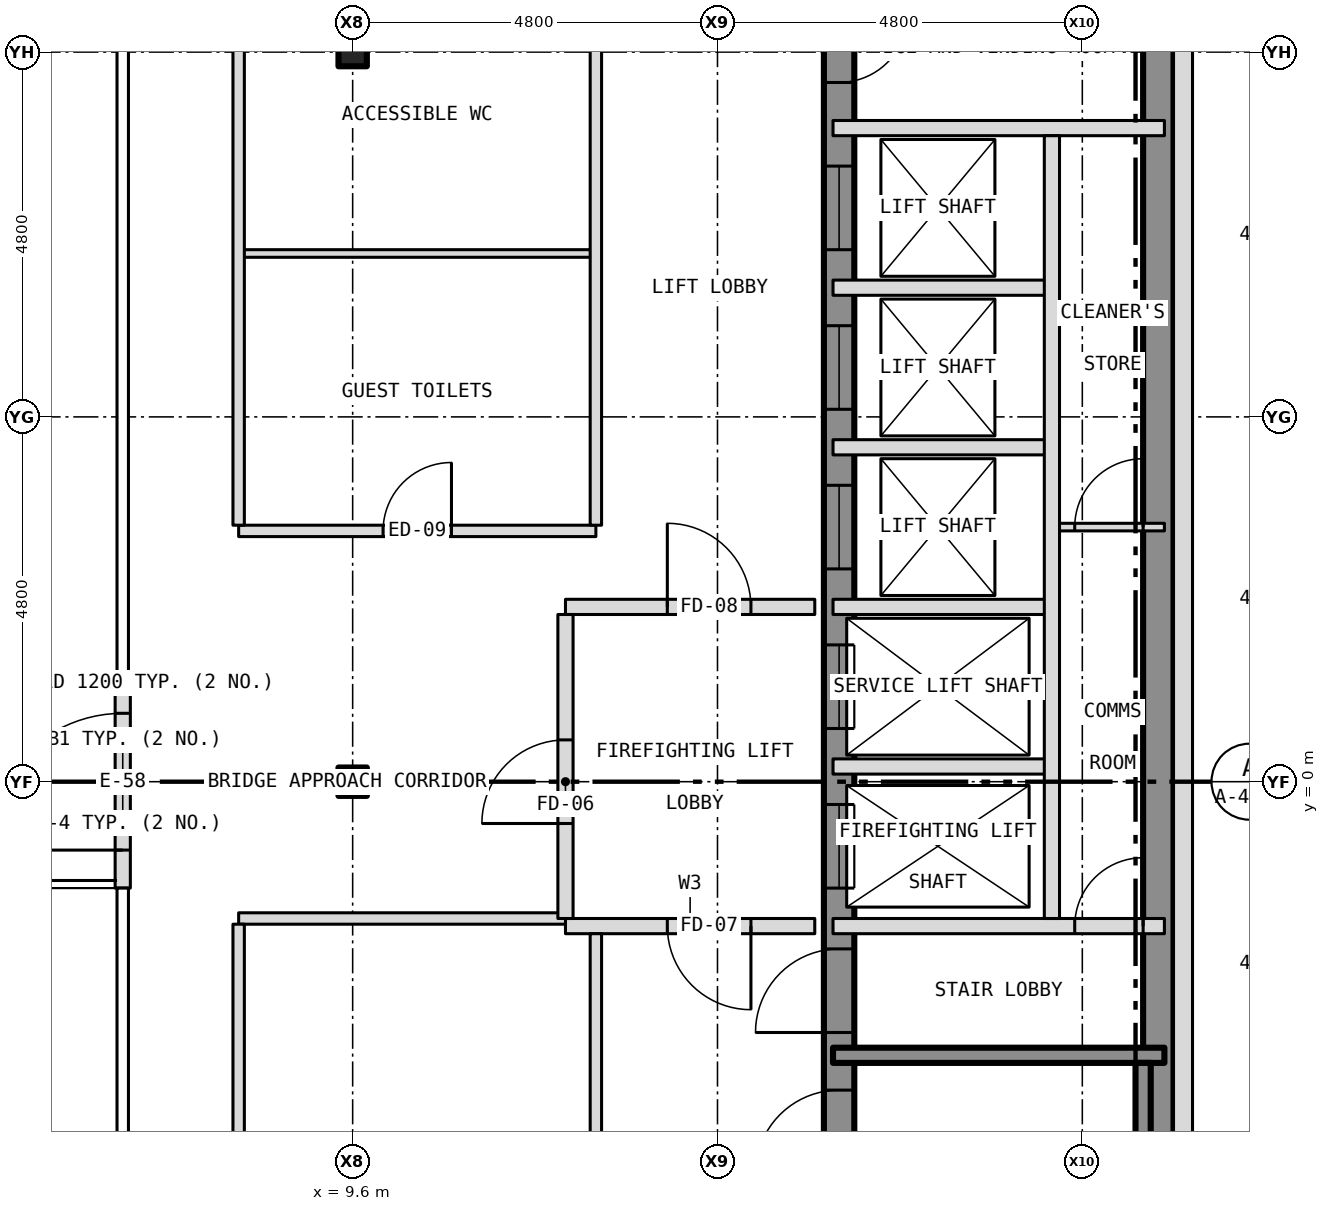
"""IFC4 building model, lengths in metres.
Left out: names, types, materials, properties, quantities, classifications, styles, units other than length and angle.
Written with IfcOpenShell. Run it as: python <this file> out.ifc"""

import sys

from ifc_helpers import new_model, si_unit, direction, frame, frame_2d, origin, origin_2d, place, context, subcontext, project, spatial, rectangle, i_section, extrude, element, fill, save


model = new_model("IFC4")
c1 = context("Model", 3, precision=1e-05, world=origin(), true_north=direction((0.0, 1.0)))
c2 = subcontext(c1, "Body", "Model", "MODEL_VIEW")
j1 = project(units=[si_unit("LENGTHUNIT", "METRE"), si_unit("PLANEANGLEUNIT", "RADIAN")], contexts=[c1])
p1 = place(None, origin())
s1 = spatial("IfcSite", under=j1, at=p1, CompositionType="ELEMENT")
p2 = place(p1, origin())
s2 = spatial("IfcBuilding", under=s1, at=p2, CompositionType="ELEMENT")
p3 = place(p2, frame((0.0, 0.0, 222.5)))
s3 = spatial("IfcBuildingStorey", under=s2, at=p3, CompositionType="ELEMENT", Elevation=222.5)
for number, where, z_axis, x_axis in (
    (1, (9.6, 0.0, -0.15), (0.0, 0.0, 1.0), (1.0, 0.0, 0.0)),
    (2, (9.6, 9.6, -0.15), (0.0, 0.0, 1.0), (1.0, 0.0, 0.0)),
):
    element("IfcColumn", number, at=place(p3, frame(where, z_axis=z_axis, x_axis=x_axis)), inside=s3, PredefinedType="COLUMN", context=c2, shape_type="SweptSolid", body=[
        extrude(i_section(OverallWidth=0.373, OverallDepth=0.373, WebThickness=0.016, FlangeThickness=0.026, at=origin_2d()), origin(), (0.0, 0.0, 1.0), 3.5),
    ])
p4 = place(p3, frame((16.0, -10.8, 0.0), z_axis=(0.0, 0.0, 1.0), x_axis=(0.0, 1.0, 0.0)))
e3 = element("IfcWall", 3, at=p4, inside=s3, PredefinedType="SHEAR", context=c2, shape_type="SweptSolid", body=[
    extrude(rectangle(XDim=21.6, YDim=0.4, at=frame_2d((10.8, 0.0))), origin(), (0.0, 0.0, 1.0), 3.25),
])
p5 = place(p4, frame((9.4, 0.0, 0.0)))
e4 = element("IfcOpeningElement", 4, at=p5, cuts=e3, PredefinedType="OPENING", context=c2, shape_type="SweptSolid", body=[
    extrude(rectangle(XDim=1.1, YDim=2.1, at=frame_2d((0.55, 1.05))), frame((0.0, 0.212, 0.0), z_axis=(0.0, -1.0, 0.0), x_axis=(1.0, 0.0, 0.0)), (0.0, 0.0, 1.0), 0.424),
])
p6 = place(p4, frame((11.5, 0.0, 0.0)))
e5 = element("IfcOpeningElement", 5, at=p6, cuts=e3, PredefinedType="OPENING", context=c2, shape_type="SweptSolid", body=[
    extrude(rectangle(XDim=1.1, YDim=2.1, at=frame_2d((0.55, 1.05))), frame((0.0, 0.212, 0.0), z_axis=(0.0, -1.0, 0.0), x_axis=(1.0, 0.0, 0.0)), (0.0, 0.0, 1.0), 0.424),
])
p7 = place(p4, frame((13.6, 0.0, 0.0)))
e6 = element("IfcOpeningElement", 6, at=p7, cuts=e3, PredefinedType="OPENING", context=c2, shape_type="SweptSolid", body=[
    extrude(rectangle(XDim=1.1, YDim=2.1, at=frame_2d((0.55, 1.05))), frame((0.0, 0.212, 0.0), z_axis=(0.0, -1.0, 0.0), x_axis=(1.0, 0.0, 0.0)), (0.0, 0.0, 1.0), 0.424),
])
p8 = place(p4, frame((15.7, 0.0, 0.0)))
e7 = element("IfcOpeningElement", 7, at=p8, cuts=e3, PredefinedType="OPENING", context=c2, shape_type="SweptSolid", body=[
    extrude(rectangle(XDim=1.1, YDim=2.1, at=frame_2d((0.55, 1.05))), frame((0.0, 0.212, 0.0), z_axis=(0.0, -1.0, 0.0), x_axis=(1.0, 0.0, 0.0)), (0.0, 0.0, 1.0), 0.424),
])
p9 = place(p4, frame((17.8, 0.0, 0.0)))
e8 = element("IfcOpeningElement", 8, at=p9, cuts=e3, PredefinedType="OPENING", context=c2, shape_type="SweptSolid", body=[
    extrude(rectangle(XDim=1.1, YDim=2.1, at=frame_2d((0.55, 1.05))), frame((0.0, 0.212, 0.0), z_axis=(0.0, -1.0, 0.0), x_axis=(1.0, 0.0, 0.0)), (0.0, 0.0, 1.0), 0.424),
])
p10 = place(p4, frame((5.642, 0.0, 0.0)))
e9 = element("IfcOpeningElement", 9, at=p10, cuts=e3, PredefinedType="OPENING", context=c2, shape_type="SweptSolid", body=[
    extrude(rectangle(XDim=1.1, YDim=2.1, at=frame_2d((0.55, 1.05))), frame((0.0, 0.212, 0.0), z_axis=(0.0, -1.0, 0.0), x_axis=(1.0, 0.0, 0.0)), (0.0, 0.0, 1.0), 0.424),
])
p11 = place(p4, frame((7.5, 0.0, 0.0)))
e10 = element("IfcOpeningElement", 10, at=p11, cuts=e3, PredefinedType="OPENING", context=c2, shape_type="SweptSolid", body=[
    extrude(rectangle(XDim=1.1, YDim=2.1, at=frame_2d((0.55, 1.05))), frame((0.0, 0.212, 0.0), z_axis=(0.0, -1.0, 0.0), x_axis=(1.0, 0.0, 0.0)), (0.0, 0.0, 1.0), 0.424),
])
p12 = place(p4, frame((20.0, 0.0, 0.0)))
e11 = element("IfcOpeningElement", 11, at=p12, cuts=e3, PredefinedType="OPENING", context=c2, shape_type="SweptSolid", body=[
    extrude(rectangle(XDim=0.9, YDim=2.1, at=frame_2d((0.45, 1.05))), frame((0.0, 0.212, 0.0), z_axis=(0.0, -1.0, 0.0), x_axis=(1.0, 0.0, 0.0)), (0.0, 0.0, 1.0), 0.424),
])
p13 = place(p3, frame((20.2, -10.8, 0.0), z_axis=(0.0, 0.0, 1.0), x_axis=(0.0, 1.0, 0.0)))
e12 = element("IfcWall", 12, at=p13, inside=s3, PredefinedType="SHEAR", context=c2, shape_type="SweptSolid", body=[
    extrude(rectangle(XDim=21.6, YDim=0.4, at=frame_2d((10.8, 0.0))), origin(), (0.0, 0.0, 1.0), 3.25),
])
p14 = place(p3, frame((20.525, -10.8, 0.0), z_axis=(0.0, 0.0, 1.0), x_axis=(0.0, 1.0, 0.0)))
e13 = element("IfcWall", 13, at=p14, inside=s3, PredefinedType="SOLIDWALL", context=c2, shape_type="SweptSolid", body=[
    extrude(rectangle(XDim=21.6, YDim=0.25, at=frame_2d((10.8, 0.0))), origin(), (0.0, 0.0, 1.0), 3.5),
])
p15 = place(p14, frame((2.95, 0.0, 1.0)))
e14 = element("IfcOpeningElement", 14, at=p15, cuts=e13, PredefinedType="OPENING", context=c2, shape_type="SweptSolid", body=[
    extrude(rectangle(XDim=0.6, YDim=1.5, at=frame_2d((0.3, 0.75))), frame((0.0, 0.137, 0.0), z_axis=(0.0, -1.0, 0.0), x_axis=(1.0, 0.0, 0.0)), (0.0, 0.0, 1.0), 0.274),
])
p16 = place(p3, frame((6.575, -1.4, 0.0), z_axis=(0.0, 0.0, 1.0), x_axis=(0.0, 1.0, 0.0)))
e15 = element("IfcWall", 15, at=p16, inside=s3, PredefinedType="SOLIDWALL", context=c2, shape_type="SweptSolid", body=[
    extrude(rectangle(XDim=2.8, YDim=0.2, at=frame_2d((1.4, 0.0))), origin(), (0.0, 0.0, 1.0), 3.5),
])
p17 = place(p16, frame((0.5, 0.0, 0.0)))
e16 = element("IfcOpeningElement", 16, at=p17, cuts=e15, PredefinedType="OPENING", context=c2, shape_type="SweptSolid", body=[
    extrude(rectangle(XDim=1.8, YDim=2.1, at=frame_2d((0.9, 1.05))), frame((0.0, 0.112, 0.0), z_axis=(0.0, -1.0, 0.0), x_axis=(1.0, 0.0, 0.0)), (0.0, 0.0, 1.0), 0.224),
])
p18 = place(p3, frame((15.92, -3.6, 0.0), z_axis=(0.0, 0.0, 1.0), x_axis=(1.0, 0.0, 0.0)))
e17 = element("IfcWall", 17, at=p18, inside=s3, PredefinedType="SHEAR", context=c2, shape_type="SweptSolid", body=[
    extrude(rectangle(XDim=4.36, YDim=0.2, at=frame_2d((2.18, 0.0))), origin(), (0.0, 0.0, 1.0), 3.25),
])
p19 = place(p3, frame((12.4, -1.9, 0.0), z_axis=(0.0, 0.0, 1.0), x_axis=(1.0, 0.0, 0.0)))
e18 = element("IfcWall", 18, at=p19, inside=s3, PredefinedType="PARTITIONING", context=c2, shape_type="SweptSolid", body=[
    extrude(rectangle(XDim=3.28, YDim=0.2, at=frame_2d((1.64, 0.0))), origin(), (0.0, 0.0, 1.0), 3.35),
])
p20 = place(p19, frame((1.34, 0.0, 0.0)))
e19 = element("IfcOpeningElement", 19, at=p20, cuts=e18, PredefinedType="OPENING", context=c2, shape_type="SweptSolid", body=[
    extrude(rectangle(XDim=1.1, YDim=2.1, at=frame_2d((0.55, 1.05))), frame((0.0, 0.112, 0.0), z_axis=(0.0, -1.0, 0.0), x_axis=(1.0, 0.0, 0.0)), (0.0, 0.0, 1.0), 0.224),
])
p21 = place(p3, frame((15.92, -1.9, 0.0), z_axis=(0.0, 0.0, 1.0), x_axis=(1.0, 0.0, 0.0)))
e20 = element("IfcWall", 20, at=p21, inside=s3, PredefinedType="PARTITIONING", context=c2, shape_type="SweptSolid", body=[
    extrude(rectangle(XDim=4.36, YDim=0.2, at=frame_2d((2.18, 0.0))), origin(), (0.0, 0.0, 1.0), 3.25),
])
p22 = place(p21, frame((3.18, 0.0, 0.0)))
e21 = element("IfcOpeningElement", 21, at=p22, cuts=e20, PredefinedType="OPENING", context=c2, shape_type="SweptSolid", body=[
    extrude(rectangle(XDim=0.9, YDim=2.1, at=frame_2d((0.45, 1.05))), frame((0.0, 0.112, 0.0), z_axis=(0.0, -1.0, 0.0), x_axis=(1.0, 0.0, 0.0)), (0.0, 0.0, 1.0), 0.224),
])
p23 = place(p3, frame((8.1, -1.8, 0.0), z_axis=(0.0, 0.0, 1.0), x_axis=(1.0, 0.0, 0.0)))
e22 = element("IfcWall", 22, at=p23, inside=s3, PredefinedType="PARTITIONING", context=c2, shape_type="SweptSolid", body=[
    extrude(rectangle(XDim=4.3, YDim=0.15, at=frame_2d((2.15, 0.0))), origin(), (0.0, 0.0, 1.0), 3.35),
])
p24 = place(p3, frame((15.92, 0.2, 0.0), z_axis=(0.0, 0.0, 1.0), x_axis=(1.0, 0.0, 0.0)))
e23 = element("IfcWall", 23, at=p24, inside=s3, PredefinedType="PARTITIONING", context=c2, shape_type="SweptSolid", body=[
    extrude(rectangle(XDim=2.88, YDim=0.2, at=frame_2d((1.44, 0.0))), origin(), (0.0, 0.0, 1.0), 3.25),
])
p25 = place(p3, frame((12.4, 2.3, 0.0), z_axis=(0.0, 0.0, 1.0), x_axis=(1.0, 0.0, 0.0)))
e24 = element("IfcWall", 24, at=p25, inside=s3, PredefinedType="PARTITIONING", context=c2, shape_type="SweptSolid", body=[
    extrude(rectangle(XDim=3.28, YDim=0.2, at=frame_2d((1.64, 0.0))), origin(), (0.0, 0.0, 1.0), 3.35),
])
p26 = place(p25, frame((1.34, 0.0, 0.0)))
e25 = element("IfcOpeningElement", 25, at=p26, cuts=e24, PredefinedType="OPENING", context=c2, shape_type="SweptSolid", body=[
    extrude(rectangle(XDim=1.1, YDim=2.1, at=frame_2d((0.55, 1.05))), frame((0.0, 0.112, 0.0), z_axis=(0.0, -1.0, 0.0), x_axis=(1.0, 0.0, 0.0)), (0.0, 0.0, 1.0), 0.224),
])
p27 = place(p3, frame((15.92, 2.3, 0.0), z_axis=(0.0, 0.0, 1.0), x_axis=(1.0, 0.0, 0.0)))
e26 = element("IfcWall", 26, at=p27, inside=s3, PredefinedType="PARTITIONING", context=c2, shape_type="SweptSolid", body=[
    extrude(rectangle(XDim=2.88, YDim=0.2, at=frame_2d((1.44, 0.0))), origin(), (0.0, 0.0, 1.0), 3.25),
])
p28 = place(p3, frame((8.1, 3.3, 0.0), z_axis=(0.0, 0.0, 1.0), x_axis=(1.0, 0.0, 0.0)))
e27 = element("IfcWall", 27, at=p28, inside=s3, PredefinedType="PARTITIONING", context=c2, shape_type="SweptSolid", body=[
    extrude(rectangle(XDim=4.7, YDim=0.15, at=frame_2d((2.35, 0.0))), origin(), (0.0, 0.0, 1.0), 3.35),
])
p29 = place(p28, frame((1.9, 0.0, 0.0)))
e28 = element("IfcOpeningElement", 28, at=p29, cuts=e27, PredefinedType="OPENING", context=c2, shape_type="SweptSolid", body=[
    extrude(rectangle(XDim=0.9, YDim=2.1, at=frame_2d((0.45, 1.05))), frame((0.0, 0.087, 0.0), z_axis=(0.0, -1.0, 0.0), x_axis=(1.0, 0.0, 0.0)), (0.0, 0.0, 1.0), 0.174),
])
p30 = place(p3, frame((18.8, 3.35, 0.0), z_axis=(0.0, 0.0, 1.0), x_axis=(1.0, 0.0, 0.0)))
e29 = element("IfcWall", 29, at=p30, inside=s3, PredefinedType="PARTITIONING", context=c2, shape_type="SweptSolid", body=[
    extrude(rectangle(XDim=1.48, YDim=0.1, at=frame_2d((0.74, 0.0))), origin(), (0.0, 0.0, 1.0), 3.25),
])
p31 = place(p30, frame((0.3, 0.0, 0.0)))
e30 = element("IfcOpeningElement", 30, at=p31, cuts=e29, PredefinedType="OPENING", context=c2, shape_type="SweptSolid", body=[
    extrude(rectangle(XDim=0.9, YDim=2.1, at=frame_2d((0.45, 1.05))), frame((0.0, 0.062, 0.0), z_axis=(0.0, -1.0, 0.0), x_axis=(1.0, 0.0, 0.0)), (0.0, 0.0, 1.0), 0.124),
])
for number, where, z_axis, x_axis in (
    (31, (15.92, 4.4, 0.0), (0.0, 0.0, 1.0), (1.0, 0.0, 0.0)),
    (32, (15.92, 6.5, 0.0), (0.0, 0.0, 1.0), (1.0, 0.0, 0.0)),
):
    element("IfcWall", number, at=place(p3, frame(where, z_axis=z_axis, x_axis=x_axis)), inside=s3, PredefinedType="PARTITIONING", context=c2, shape_type="SweptSolid", body=[
        extrude(rectangle(XDim=2.88, YDim=0.2, at=frame_2d((1.44, 0.0))), origin(), (0.0, 0.0, 1.0), 3.25),
    ])
p32 = place(p3, frame((8.1, 6.95, 0.0), z_axis=(0.0, 0.0, 1.0), x_axis=(1.0, 0.0, 0.0)))
e33 = element("IfcWall", 33, at=p32, inside=s3, PredefinedType="PARTITIONING", context=c2, shape_type="SweptSolid", body=[
    extrude(rectangle(XDim=4.7, YDim=0.1, at=frame_2d((2.35, 0.0))), origin(), (0.0, 0.0, 1.0), 3.35),
])
p33 = place(p3, frame((15.92, 8.6, 0.0), z_axis=(0.0, 0.0, 1.0), x_axis=(1.0, 0.0, 0.0)))
e34 = element("IfcWall", 34, at=p33, inside=s3, PredefinedType="PARTITIONING", context=c2, shape_type="SweptSolid", body=[
    extrude(rectangle(XDim=4.36, YDim=0.2, at=frame_2d((2.18, 0.0))), origin(), (0.0, 0.0, 1.0), 3.25),
])
p34 = place(p3, frame((8.1, -10.525, 0.0), z_axis=(0.0, 0.0, 1.0), x_axis=(0.0, 1.0, 0.0)))
e35 = element("IfcWall", 35, at=p34, inside=s3, PredefinedType="PARTITIONING", context=c2, shape_type="SweptSolid", body=[
    extrude(rectangle(XDim=8.65, YDim=0.15, at=frame_2d((4.325, 0.0))), origin(), (0.0, 0.0, 1.0), 3.35),
])
p35 = place(p34, frame((3.875, 0.0, 0.0)))
e36 = element("IfcOpeningElement", 36, at=p35, cuts=e35, PredefinedType="OPENING", context=c2, shape_type="SweptSolid", body=[
    extrude(rectangle(XDim=0.9, YDim=2.1, at=frame_2d((0.45, 1.05))), frame((0.0, 0.087, 0.0), z_axis=(0.0, -1.0, 0.0), x_axis=(1.0, 0.0, 0.0)), (0.0, 0.0, 1.0), 0.174),
])
p36 = place(p3, frame((8.1, 3.375, 0.0), z_axis=(0.0, 0.0, 1.0), x_axis=(0.0, 1.0, 0.0)))
e37 = element("IfcWall", 37, at=p36, inside=s3, PredefinedType="PARTITIONING", context=c2, shape_type="SweptSolid", body=[
    extrude(rectangle(XDim=7.15, YDim=0.15, at=frame_2d((3.575, 0.0))), origin(), (0.0, 0.0, 1.0), 3.35),
])
p37 = place(p3, frame((12.4, -1.8, 0.0), z_axis=(0.0, 0.0, 1.0), x_axis=(0.0, 1.0, 0.0)))
e38 = element("IfcWall", 38, at=p37, inside=s3, PredefinedType="PARTITIONING", context=c2, shape_type="SweptSolid", body=[
    extrude(rectangle(XDim=4.0, YDim=0.2, at=frame_2d((2.0, 0.0))), origin(), (0.0, 0.0, 1.0), 3.35),
])
p38 = place(p37, frame((1.25, 0.0, 0.0)))
e39 = element("IfcOpeningElement", 39, at=p38, cuts=e38, PredefinedType="OPENING", context=c2, shape_type="SweptSolid", body=[
    extrude(rectangle(XDim=1.1, YDim=2.1, at=frame_2d((0.55, 1.05))), frame((0.0, 0.112, 0.0), z_axis=(0.0, -1.0, 0.0), x_axis=(1.0, 0.0, 0.0)), (0.0, 0.0, 1.0), 0.224),
])
p39 = place(p3, frame((12.8, -10.525, 0.0), z_axis=(0.0, 0.0, 1.0), x_axis=(0.0, 1.0, 0.0)))
e40 = element("IfcWall", 40, at=p39, inside=s3, PredefinedType="PARTITIONING", context=c2, shape_type="SweptSolid", body=[
    extrude(rectangle(XDim=8.525, YDim=0.15, at=frame_2d((4.262, 0.0))), origin(), (0.0, 0.0, 1.0), 3.35),
])
p40 = place(p3, frame((12.8, 3.375, 0.0), z_axis=(0.0, 0.0, 1.0), x_axis=(0.0, 1.0, 0.0)))
e41 = element("IfcWall", 41, at=p40, inside=s3, PredefinedType="PARTITIONING", context=c2, shape_type="SweptSolid", body=[
    extrude(rectangle(XDim=7.175, YDim=0.15, at=frame_2d((3.587, 0.0))), origin(), (0.0, 0.0, 1.0), 3.35),
])
p41 = place(p3, frame((18.8, -1.8, 0.0), z_axis=(0.0, 0.0, 1.0), x_axis=(0.0, 1.0, 0.0)))
e42 = element("IfcWall", 42, at=p41, inside=s3, PredefinedType="PARTITIONING", context=c2, shape_type="SweptSolid", body=[
    extrude(rectangle(XDim=10.3, YDim=0.2, at=frame_2d((5.15, 0.0))), origin(), (0.0, 0.0, 1.0), 3.25),
])
p42 = place(p3, frame((20.0, -10.68, 0.0), z_axis=(0.0, 0.0, 1.0), x_axis=(0.0, 1.0, 0.0)))
e43 = element("IfcWall", 43, at=p42, inside=s3, PredefinedType="SHEAR", context=c2, shape_type="SweptSolid", body=[
    extrude(rectangle(XDim=6.98, YDim=0.2, at=frame_2d((3.49, 0.0))), origin(), (0.0, 0.0, 1.0), 3.25),
])
p43 = place(p17, origin())
e44 = element("IfcDoor", 44, at=p43, inside=s3, OperationType="DOUBLE_DOOR_DOUBLE_SWING", PredefinedType="DOOR", context=c2, shape_type="SweptSolid", body=[
    extrude(rectangle(XDim=1.8, YDim=2.1, at=frame_2d((0.9, 1.05))), frame((0.0, 0.025, 0.0), z_axis=(0.0, -1.0, 0.0), x_axis=(1.0, 0.0, 0.0)), (0.0, 0.0, 1.0), 0.05),
])
fill(e16, e44)
p44 = place(p5, origin())
e45 = element("IfcDoor", 45, at=p44, inside=s3, OperationType="SLIDING_TO_LEFT", PredefinedType="DOOR", context=c2, shape_type="SweptSolid", body=[
    extrude(rectangle(XDim=1.1, YDim=2.1, at=frame_2d((0.55, 1.05))), frame((0.0, 0.025, 0.0), z_axis=(0.0, -1.0, 0.0), x_axis=(1.0, 0.0, 0.0)), (0.0, 0.0, 1.0), 0.05),
])
fill(e4, e45)
p45 = place(p6, origin())
e46 = element("IfcDoor", 46, at=p45, inside=s3, OperationType="SLIDING_TO_LEFT", PredefinedType="DOOR", context=c2, shape_type="SweptSolid", body=[
    extrude(rectangle(XDim=1.1, YDim=2.1, at=frame_2d((0.55, 1.05))), frame((0.0, 0.025, 0.0), z_axis=(0.0, -1.0, 0.0), x_axis=(1.0, 0.0, 0.0)), (0.0, 0.0, 1.0), 0.05),
])
fill(e5, e46)
p46 = place(p7, origin())
e47 = element("IfcDoor", 47, at=p46, inside=s3, OperationType="SLIDING_TO_LEFT", PredefinedType="DOOR", context=c2, shape_type="SweptSolid", body=[
    extrude(rectangle(XDim=1.1, YDim=2.1, at=frame_2d((0.55, 1.05))), frame((0.0, 0.025, 0.0), z_axis=(0.0, -1.0, 0.0), x_axis=(1.0, 0.0, 0.0)), (0.0, 0.0, 1.0), 0.05),
])
fill(e6, e47)
p47 = place(p8, origin())
e48 = element("IfcDoor", 48, at=p47, inside=s3, OperationType="SLIDING_TO_LEFT", PredefinedType="DOOR", context=c2, shape_type="SweptSolid", body=[
    extrude(rectangle(XDim=1.1, YDim=2.1, at=frame_2d((0.55, 1.05))), frame((0.0, 0.025, 0.0), z_axis=(0.0, -1.0, 0.0), x_axis=(1.0, 0.0, 0.0)), (0.0, 0.0, 1.0), 0.05),
])
fill(e7, e48)
p48 = place(p9, origin())
e49 = element("IfcDoor", 49, at=p48, inside=s3, OperationType="SLIDING_TO_LEFT", PredefinedType="DOOR", context=c2, shape_type="SweptSolid", body=[
    extrude(rectangle(XDim=1.1, YDim=2.1, at=frame_2d((0.55, 1.05))), frame((0.0, 0.025, 0.0), z_axis=(0.0, -1.0, 0.0), x_axis=(1.0, 0.0, 0.0)), (0.0, 0.0, 1.0), 0.05),
])
fill(e8, e49)
p49 = place(p10, origin())
e50 = element("IfcDoor", 50, at=p49, inside=s3, OperationType="SINGLE_SWING_LEFT", PredefinedType="DOOR", context=c2, shape_type="SweptSolid", body=[
    extrude(rectangle(XDim=1.1, YDim=2.1, at=frame_2d((0.55, 1.05))), frame((0.0, 0.025, 0.0), z_axis=(0.0, -1.0, 0.0), x_axis=(1.0, 0.0, 0.0)), (0.0, 0.0, 1.0), 0.05),
])
fill(e9, e50)
p50 = place(p11, origin())
e51 = element("IfcDoor", 51, at=p50, inside=s3, OperationType="SINGLE_SWING_LEFT", PredefinedType="DOOR", context=c2, shape_type="SweptSolid", body=[
    extrude(rectangle(XDim=1.1, YDim=2.1, at=frame_2d((0.55, 1.05))), frame((0.0, 0.025, 0.0), z_axis=(0.0, -1.0, 0.0), x_axis=(1.0, 0.0, 0.0)), (0.0, 0.0, 1.0), 0.05),
])
fill(e10, e51)
p51 = place(p12, origin())
e52 = element("IfcDoor", 52, at=p51, inside=s3, OperationType="SINGLE_SWING_RIGHT", PredefinedType="DOOR", context=c2, shape_type="SweptSolid", body=[
    extrude(rectangle(XDim=0.9, YDim=2.1, at=frame_2d((0.45, 1.05))), frame((0.0, 0.025, 0.0), z_axis=(0.0, -1.0, 0.0), x_axis=(1.0, 0.0, 0.0)), (0.0, 0.0, 1.0), 0.05),
])
fill(e11, e52)
p52 = place(p22, origin())
e53 = element("IfcDoor", 53, at=p52, inside=s3, OperationType="SINGLE_SWING_RIGHT", PredefinedType="DOOR", context=c2, shape_type="SweptSolid", body=[
    extrude(rectangle(XDim=0.9, YDim=2.1, at=frame_2d((0.45, 1.05))), frame((0.0, 0.025, 0.0), z_axis=(0.0, -1.0, 0.0), x_axis=(1.0, 0.0, 0.0)), (0.0, 0.0, 1.0), 0.05),
])
fill(e21, e53)
p53 = place(p31, origin())
e54 = element("IfcDoor", 54, at=p53, inside=s3, OperationType="SINGLE_SWING_RIGHT", PredefinedType="DOOR", context=c2, shape_type="SweptSolid", body=[
    extrude(rectangle(XDim=0.9, YDim=2.1, at=frame_2d((0.45, 1.05))), frame((0.0, 0.025, 0.0), z_axis=(0.0, -1.0, 0.0), x_axis=(1.0, 0.0, 0.0)), (0.0, 0.0, 1.0), 0.05),
])
fill(e30, e54)
p54 = place(p38, origin())
e55 = element("IfcDoor", 55, at=p54, inside=s3, OperationType="SINGLE_SWING_LEFT", PredefinedType="DOOR", context=c2, shape_type="SweptSolid", body=[
    extrude(rectangle(XDim=1.1, YDim=2.1, at=frame_2d((0.55, 1.05))), frame((0.0, 0.025, 0.0), z_axis=(0.0, -1.0, 0.0), x_axis=(1.0, 0.0, 0.0)), (0.0, 0.0, 1.0), 0.05),
])
fill(e39, e55)
p55 = place(p20, origin())
e56 = element("IfcDoor", 56, at=p55, inside=s3, OperationType="SINGLE_SWING_RIGHT", PredefinedType="DOOR", context=c2, shape_type="SweptSolid", body=[
    extrude(rectangle(XDim=1.1, YDim=2.1, at=frame_2d((0.55, 1.05))), frame((0.0, 0.025, 0.0), z_axis=(0.0, -1.0, 0.0), x_axis=(1.0, 0.0, 0.0)), (0.0, 0.0, 1.0), 0.05),
])
fill(e19, e56)
p56 = place(p26, origin())
e57 = element("IfcDoor", 57, at=p56, inside=s3, OperationType="SINGLE_SWING_LEFT", PredefinedType="DOOR", context=c2, shape_type="SweptSolid", body=[
    extrude(rectangle(XDim=1.1, YDim=2.1, at=frame_2d((0.55, 1.05))), frame((0.0, 0.025, 0.0), z_axis=(0.0, -1.0, 0.0), x_axis=(1.0, 0.0, 0.0)), (0.0, 0.0, 1.0), 0.05),
])
fill(e25, e57)
p57 = place(p29, origin())
e58 = element("IfcDoor", 58, at=p57, inside=s3, OperationType="SINGLE_SWING_RIGHT", PredefinedType="DOOR", context=c2, shape_type="SweptSolid", body=[
    extrude(rectangle(XDim=0.9, YDim=2.1, at=frame_2d((0.45, 1.05))), frame((0.0, 0.025, 0.0), z_axis=(0.0, -1.0, 0.0), x_axis=(1.0, 0.0, 0.0)), (0.0, 0.0, 1.0), 0.05),
])
fill(e28, e58)
save(model, sys.argv[1])
